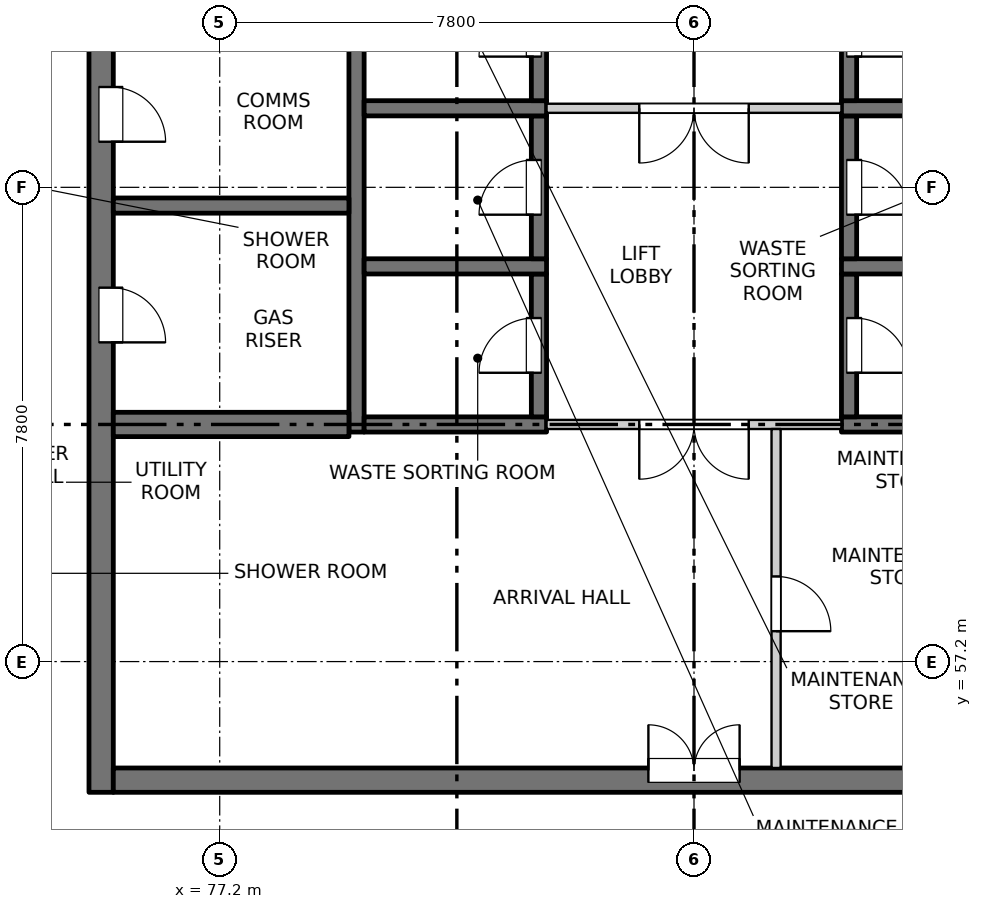
"""IFC4 building model, lengths in metres.
Left out: names, types, materials, properties, quantities, classifications, styles, units other than length and angle.
Written with IfcOpenShell. Run it as: python <this file> out.ifc"""

import sys

from ifc_helpers import new_model, si_unit, direction, frame, frame_2d, origin, place, context, subcontext, project, spatial, rectangle, extrude, element, fill, save


model = new_model("IFC4")
c1 = context("Model", 3, precision=1e-05, world=origin(), true_north=direction((0.0, 1.0)))
c2 = subcontext(c1, "Body", "Model", "MODEL_VIEW")
j1 = project(units=[si_unit("LENGTHUNIT", "METRE"), si_unit("PLANEANGLEUNIT", "RADIAN")], contexts=[c1])
p1 = place(None, origin())
s1 = spatial("IfcSite", under=j1, at=p1, CompositionType="ELEMENT")
p2 = place(p1, origin())
s2 = spatial("IfcBuilding", under=s1, at=p2, CompositionType="ELEMENT")
p3 = place(p2, frame((0.0, 0.0, 231.3)))
s3 = spatial("IfcBuildingStorey", under=s2, at=p3, CompositionType="ELEMENT", Elevation=231.3)
p4 = place(p3, frame((75.25, 55.05, -0.25), z_axis=(0.0, 0.0, 1.0), x_axis=(0.0, 1.0, 0.0)))
e1 = element("IfcWall", 1, at=p4, inside=s3, PredefinedType="SOLIDWALL", context=c2, shape_type="SweptSolid", body=[
    extrude(rectangle(XDim=22.25, YDim=0.4, at=frame_2d((11.125, 0.0))), origin(), (0.0, 0.0, 1.0), 3.4),
])
p5 = place(p4, frame((7.4, 0.0, 0.25)))
e2 = element("IfcOpeningElement", 2, at=p5, cuts=e1, PredefinedType="OPENING", context=c2, shape_type="SweptSolid", body=[
    extrude(rectangle(XDim=0.9, YDim=2.1, at=frame_2d((0.45, 1.05))), frame((0.0, 0.21, 0.0), z_axis=(0.0, -1.0, 0.0), x_axis=(1.0, 0.0, 0.0)), (0.0, 0.0, 1.0), 0.42),
])
p6 = place(p4, frame((10.7, 0.0, 0.25)))
e3 = element("IfcOpeningElement", 3, at=p6, cuts=e1, PredefinedType="OPENING", context=c2, shape_type="SweptSolid", body=[
    extrude(rectangle(XDim=0.9, YDim=2.1, at=frame_2d((0.45, 1.05))), frame((0.0, 0.21, 0.0), z_axis=(0.0, -1.0, 0.0), x_axis=(1.0, 0.0, 0.0)), (0.0, 0.0, 1.0), 0.42),
])
p7 = place(p4, frame((15.2, 0.0, 0.25)))
e4 = element("IfcOpeningElement", 4, at=p7, cuts=e1, PredefinedType="OPENING", context=c2, shape_type="SweptSolid", body=[
    extrude(rectangle(XDim=0.9, YDim=2.1, at=frame_2d((0.45, 1.05))), frame((0.0, 0.21, 0.0), z_axis=(0.0, -1.0, 0.0), x_axis=(1.0, 0.0, 0.0)), (0.0, 0.0, 1.0), 0.42),
])
p8 = place(p4, frame((20.0, 0.0, 0.25)))
e5 = element("IfcOpeningElement", 5, at=p8, cuts=e1, PredefinedType="OPENING", context=c2, shape_type="SweptSolid", body=[
    extrude(rectangle(XDim=0.9, YDim=2.1, at=frame_2d((0.45, 1.05))), frame((0.0, 0.21, 0.0), z_axis=(0.0, -1.0, 0.0), x_axis=(1.0, 0.0, 0.0)), (0.0, 0.0, 1.0), 0.42),
])
p9 = place(p3, frame((75.45, 55.25, -0.25), z_axis=(0.0, 0.0, 1.0), x_axis=(1.0, 0.0, 0.0)))
e6 = element("IfcWall", 6, at=p9, inside=s3, PredefinedType="SOLIDWALL", context=c2, shape_type="SweptSolid", body=[
    extrude(rectangle(XDim=19.1, YDim=0.4, at=frame_2d((9.55, 0.0))), origin(), (0.0, 0.0, 1.0), 3.4),
])
p10 = place(p9, frame((8.8, 0.0, 0.25)))
e7 = element("IfcOpeningElement", 7, at=p10, cuts=e6, PredefinedType="OPENING", context=c2, shape_type="SweptSolid", body=[
    extrude(rectangle(XDim=1.5, YDim=2.1, at=frame_2d((0.75, 1.05))), frame((0.0, 0.21, 0.0), z_axis=(0.0, -1.0, 0.0), x_axis=(1.0, 0.0, 0.0)), (0.0, 0.0, 1.0), 0.42),
])
p11 = place(p3, frame((79.45, 60.975, -0.25), z_axis=(0.0, 0.0, 1.0), x_axis=(0.0, 1.0, 0.0)))
e8 = element("IfcWall", 8, at=p11, inside=s3, PredefinedType="SOLIDWALL", context=c2, shape_type="SweptSolid", body=[
    extrude(rectangle(XDim=16.325, YDim=0.25, at=frame_2d((8.163, 0.0))), origin(), (0.0, 0.0, 1.0), 3.4),
])
p12 = place(p3, frame((79.575, 61.1, -0.25), z_axis=(0.0, 0.0, 1.0), x_axis=(1.0, 0.0, 0.0)))
e9 = element("IfcWall", 9, at=p12, inside=s3, PredefinedType="SOLIDWALL", context=c2, shape_type="SweptSolid", body=[
    extrude(rectangle(XDim=3.0, YDim=0.25, at=frame_2d((1.5, 0.0))), origin(), (0.0, 0.0, 1.0), 3.4),
])
p13 = place(p3, frame((82.45, 61.225, -0.25), z_axis=(0.0, 0.0, 1.0), x_axis=(0.0, 1.0, 0.0)))
e10 = element("IfcWall", 10, at=p13, inside=s3, PredefinedType="SOLIDWALL", context=c2, shape_type="SweptSolid", body=[
    extrude(rectangle(XDim=2.35, YDim=0.25, at=frame_2d((1.175, 0.0))), origin(), (0.0, 0.0, 1.0), 3.4),
])
p14 = place(p13, frame((0.725, 0.0, 0.25)))
e11 = element("IfcOpeningElement", 11, at=p14, cuts=e10, PredefinedType="OPENING", context=c2, shape_type="SweptSolid", body=[
    extrude(rectangle(XDim=0.9, YDim=2.1, at=frame_2d((0.45, 1.05))), frame((0.0, 0.135, 0.0), z_axis=(0.0, -1.0, 0.0), x_axis=(1.0, 0.0, 0.0)), (0.0, 0.0, 1.0), 0.27),
])
p15 = place(p3, frame((79.575, 63.7, -0.25), z_axis=(0.0, 0.0, 1.0), x_axis=(1.0, 0.0, 0.0)))
e12 = element("IfcWall", 12, at=p15, inside=s3, PredefinedType="SOLIDWALL", context=c2, shape_type="SweptSolid", body=[
    extrude(rectangle(XDim=3.0, YDim=0.25, at=frame_2d((1.5, 0.0))), origin(), (0.0, 0.0, 1.0), 3.4),
])
p16 = place(p3, frame((82.45, 63.825, -0.25), z_axis=(0.0, 0.0, 1.0), x_axis=(0.0, 1.0, 0.0)))
e13 = element("IfcWall", 13, at=p16, inside=s3, PredefinedType="SOLIDWALL", context=c2, shape_type="SweptSolid", body=[
    extrude(rectangle(XDim=2.35, YDim=0.25, at=frame_2d((1.175, 0.0))), origin(), (0.0, 0.0, 1.0), 3.4),
])
p17 = place(p16, frame((0.725, 0.0, 0.25)))
e14 = element("IfcOpeningElement", 14, at=p17, cuts=e13, PredefinedType="OPENING", context=c2, shape_type="SweptSolid", body=[
    extrude(rectangle(XDim=0.9, YDim=2.1, at=frame_2d((0.45, 1.05))), frame((0.0, 0.135, 0.0), z_axis=(0.0, -1.0, 0.0), x_axis=(1.0, 0.0, 0.0)), (0.0, 0.0, 1.0), 0.27),
])
p18 = place(p3, frame((79.575, 66.3, -0.25), z_axis=(0.0, 0.0, 1.0), x_axis=(1.0, 0.0, 0.0)))
e15 = element("IfcWall", 15, at=p18, inside=s3, PredefinedType="SOLIDWALL", context=c2, shape_type="SweptSolid", body=[
    extrude(rectangle(XDim=3.0, YDim=0.25, at=frame_2d((1.5, 0.0))), origin(), (0.0, 0.0, 1.0), 3.4),
])
p19 = place(p3, frame((82.45, 66.425, -0.25), z_axis=(0.0, 0.0, 1.0), x_axis=(0.0, 1.0, 0.0)))
e16 = element("IfcWall", 16, at=p19, inside=s3, PredefinedType="SOLIDWALL", context=c2, shape_type="SweptSolid", body=[
    extrude(rectangle(XDim=2.35, YDim=0.25, at=frame_2d((1.175, 0.0))), origin(), (0.0, 0.0, 1.0), 3.4),
])
p20 = place(p19, frame((0.725, 0.0, 0.25)))
e17 = element("IfcOpeningElement", 17, at=p20, cuts=e16, PredefinedType="OPENING", context=c2, shape_type="SweptSolid", body=[
    extrude(rectangle(XDim=0.9, YDim=2.1, at=frame_2d((0.45, 1.05))), frame((0.0, 0.135, 0.0), z_axis=(0.0, -1.0, 0.0), x_axis=(1.0, 0.0, 0.0)), (0.0, 0.0, 1.0), 0.27),
])
p21 = place(p3, frame((87.425, 61.1, -0.25), z_axis=(0.0, 0.0, 1.0), x_axis=(1.0, 0.0, 0.0)))
e18 = element("IfcWall", 18, at=p21, inside=s3, PredefinedType="SOLIDWALL", context=c2, shape_type="SweptSolid", body=[
    extrude(rectangle(XDim=3.0, YDim=0.25, at=frame_2d((1.5, 0.0))), origin(), (0.0, 0.0, 1.0), 3.4),
])
p22 = place(p3, frame((87.55, 61.225, -0.25), z_axis=(0.0, 0.0, 1.0), x_axis=(0.0, 1.0, 0.0)))
e19 = element("IfcWall", 19, at=p22, inside=s3, PredefinedType="SOLIDWALL", context=c2, shape_type="SweptSolid", body=[
    extrude(rectangle(XDim=2.35, YDim=0.25, at=frame_2d((1.175, 0.0))), origin(), (0.0, 0.0, 1.0), 3.4),
])
p23 = place(p22, frame((0.725, 0.0, 0.25)))
e20 = element("IfcOpeningElement", 20, at=p23, cuts=e19, PredefinedType="OPENING", context=c2, shape_type="SweptSolid", body=[
    extrude(rectangle(XDim=0.9, YDim=2.1, at=frame_2d((0.45, 1.05))), frame((0.0, 0.135, 0.0), z_axis=(0.0, -1.0, 0.0), x_axis=(1.0, 0.0, 0.0)), (0.0, 0.0, 1.0), 0.27),
])
p24 = place(p3, frame((87.425, 63.7, -0.25), z_axis=(0.0, 0.0, 1.0), x_axis=(1.0, 0.0, 0.0)))
e21 = element("IfcWall", 21, at=p24, inside=s3, PredefinedType="SOLIDWALL", context=c2, shape_type="SweptSolid", body=[
    extrude(rectangle(XDim=3.0, YDim=0.25, at=frame_2d((1.5, 0.0))), origin(), (0.0, 0.0, 1.0), 3.4),
])
p25 = place(p3, frame((87.55, 63.825, -0.25), z_axis=(0.0, 0.0, 1.0), x_axis=(0.0, 1.0, 0.0)))
e22 = element("IfcWall", 22, at=p25, inside=s3, PredefinedType="SOLIDWALL", context=c2, shape_type="SweptSolid", body=[
    extrude(rectangle(XDim=2.35, YDim=0.25, at=frame_2d((1.175, 0.0))), origin(), (0.0, 0.0, 1.0), 3.4),
])
p26 = place(p25, frame((0.725, 0.0, 0.25)))
e23 = element("IfcOpeningElement", 23, at=p26, cuts=e22, PredefinedType="OPENING", context=c2, shape_type="SweptSolid", body=[
    extrude(rectangle(XDim=0.9, YDim=2.1, at=frame_2d((0.45, 1.05))), frame((0.0, 0.135, 0.0), z_axis=(0.0, -1.0, 0.0), x_axis=(1.0, 0.0, 0.0)), (0.0, 0.0, 1.0), 0.27),
])
p27 = place(p3, frame((87.425, 66.3, -0.25), z_axis=(0.0, 0.0, 1.0), x_axis=(1.0, 0.0, 0.0)))
e24 = element("IfcWall", 24, at=p27, inside=s3, PredefinedType="SOLIDWALL", context=c2, shape_type="SweptSolid", body=[
    extrude(rectangle(XDim=3.0, YDim=0.25, at=frame_2d((1.5, 0.0))), origin(), (0.0, 0.0, 1.0), 3.4),
])
p28 = place(p3, frame((87.55, 66.425, -0.25), z_axis=(0.0, 0.0, 1.0), x_axis=(0.0, 1.0, 0.0)))
e25 = element("IfcWall", 25, at=p28, inside=s3, PredefinedType="SOLIDWALL", context=c2, shape_type="SweptSolid", body=[
    extrude(rectangle(XDim=2.35, YDim=0.25, at=frame_2d((1.175, 0.0))), origin(), (0.0, 0.0, 1.0), 3.4),
])
p29 = place(p28, frame((0.725, 0.0, 0.25)))
e26 = element("IfcOpeningElement", 26, at=p29, cuts=e25, PredefinedType="OPENING", context=c2, shape_type="SweptSolid", body=[
    extrude(rectangle(XDim=0.9, YDim=2.1, at=frame_2d((0.45, 1.05))), frame((0.0, 0.135, 0.0), z_axis=(0.0, -1.0, 0.0), x_axis=(1.0, 0.0, 0.0)), (0.0, 0.0, 1.0), 0.27),
])
p30 = place(p3, frame((75.45, 61.1, -0.25), z_axis=(0.0, 0.0, 1.0), x_axis=(1.0, 0.0, 0.0)))
e27 = element("IfcWall", 27, at=p30, inside=s3, PredefinedType="SOLIDWALL", context=c2, shape_type="SweptSolid", body=[
    extrude(rectangle(XDim=3.875, YDim=0.4, at=frame_2d((1.938, 0.0))), origin(), (0.0, 0.0, 1.0), 3.4),
])
p31 = place(p3, frame((75.45, 64.7, -0.25), z_axis=(0.0, 0.0, 1.0), x_axis=(1.0, 0.0, 0.0)))
e28 = element("IfcWall", 28, at=p31, inside=s3, PredefinedType="SOLIDWALL", context=c2, shape_type="SweptSolid", body=[
    extrude(rectangle(XDim=3.875, YDim=0.25, at=frame_2d((1.938, 0.0))), origin(), (0.0, 0.0, 1.0), 3.4),
])
p32 = place(p3, frame((82.575, 61.1, 0.0), z_axis=(0.0, 0.0, 1.0), x_axis=(1.0, 0.0, 0.0)))
e29 = element("IfcWall", 29, at=p32, inside=s3, PredefinedType="PARTITIONING", context=c2, shape_type="SweptSolid", body=[
    extrude(rectangle(XDim=4.85, YDim=0.15, at=frame_2d((2.425, 0.0))), origin(), (0.0, 0.0, 1.0), 3.15),
])
p33 = place(p32, frame((1.525, 0.0, 0.0)))
e30 = element("IfcOpeningElement", 30, at=p33, cuts=e29, PredefinedType="OPENING", context=c2, shape_type="SweptSolid", body=[
    extrude(rectangle(XDim=1.8, YDim=2.1, at=frame_2d((0.9, 1.05))), frame((0.0, 0.085, 0.0), z_axis=(0.0, -1.0, 0.0), x_axis=(1.0, 0.0, 0.0)), (0.0, 0.0, 1.0), 0.17),
])
p34 = place(p3, frame((82.575, 66.3, 0.0), z_axis=(0.0, 0.0, 1.0), x_axis=(1.0, 0.0, 0.0)))
e31 = element("IfcWall", 31, at=p34, inside=s3, PredefinedType="PARTITIONING", context=c2, shape_type="SweptSolid", body=[
    extrude(rectangle(XDim=4.85, YDim=0.15, at=frame_2d((2.425, 0.0))), origin(), (0.0, 0.0, 1.0), 3.15),
])
p35 = place(p34, frame((1.525, 0.0, 0.0)))
e32 = element("IfcOpeningElement", 32, at=p35, cuts=e31, PredefinedType="OPENING", context=c2, shape_type="SweptSolid", body=[
    extrude(rectangle(XDim=1.8, YDim=2.1, at=frame_2d((0.9, 1.05))), frame((0.0, 0.085, 0.0), z_axis=(0.0, -1.0, 0.0), x_axis=(1.0, 0.0, 0.0)), (0.0, 0.0, 1.0), 0.17),
])
p36 = place(p3, frame((86.35, 55.45, 0.0), z_axis=(0.0, 0.0, 1.0), x_axis=(0.0, 1.0, 0.0)))
e33 = element("IfcWall", 33, at=p36, inside=s3, PredefinedType="PARTITIONING", context=c2, shape_type="SweptSolid", body=[
    extrude(rectangle(XDim=5.575, YDim=0.15, at=frame_2d((2.788, 0.0))), origin(), (0.0, 0.0, 1.0), 3.15),
])
p37 = place(p36, frame((2.25, 0.0, 0.0)))
e34 = element("IfcOpeningElement", 34, at=p37, cuts=e33, PredefinedType="OPENING", context=c2, shape_type="SweptSolid", body=[
    extrude(rectangle(XDim=0.9, YDim=2.1, at=frame_2d((0.45, 1.05))), frame((0.0, 0.085, 0.0), z_axis=(0.0, -1.0, 0.0), x_axis=(1.0, 0.0, 0.0)), (0.0, 0.0, 1.0), 0.17),
])
p38 = place(p10, origin())
e35 = element("IfcDoor", 35, at=p38, inside=s3, OperationType="DOUBLE_DOOR_SINGLE_SWING", PredefinedType="DOOR", context=c2, shape_type="SweptSolid", body=[
    extrude(rectangle(XDim=1.5, YDim=2.1, at=frame_2d((0.75, 1.05))), frame((0.0, 0.185, 0.0), z_axis=(0.0, -1.0, 0.0), x_axis=(1.0, 0.0, 0.0)), (0.0, 0.0, 1.0), 0.05),
])
fill(e7, e35)
p39 = place(p37, origin())
e36 = element("IfcDoor", 36, at=p39, inside=s3, OperationType="SINGLE_SWING_RIGHT", PredefinedType="DOOR", context=c2, shape_type="SweptSolid", body=[
    extrude(rectangle(XDim=0.9, YDim=2.1, at=frame_2d((0.45, 1.05))), frame((0.0, 0.025, 0.0), z_axis=(0.0, -1.0, 0.0), x_axis=(1.0, 0.0, 0.0)), (0.0, 0.0, 1.0), 0.05),
])
fill(e34, e36)
p40 = place(p33, origin())
e37 = element("IfcDoor", 37, at=p40, inside=s3, OperationType="DOUBLE_DOOR_SINGLE_SWING", PredefinedType="DOOR", context=c2, shape_type="SweptSolid", body=[
    extrude(rectangle(XDim=1.8, YDim=2.1, at=frame_2d((0.9, 1.05))), frame((0.0, 0.025, 0.0), z_axis=(0.0, -1.0, 0.0), x_axis=(1.0, 0.0, 0.0)), (0.0, 0.0, 1.0), 0.05),
])
fill(e30, e37)
p41 = place(p14, origin())
e38 = element("IfcDoor", 38, at=p41, inside=s3, OperationType="SINGLE_SWING_LEFT", PredefinedType="DOOR", context=c2, shape_type="SweptSolid", body=[
    extrude(rectangle(XDim=0.9, YDim=2.1, at=frame_2d((0.45, 1.05))), frame((0.0, 0.11, 0.0), z_axis=(0.0, -1.0, 0.0), x_axis=(1.0, 0.0, 0.0)), (0.0, 0.0, 1.0), 0.05),
])
fill(e11, e38)
p42 = place(p23, origin())
e39 = element("IfcDoor", 39, at=p42, inside=s3, OperationType="SINGLE_SWING_RIGHT", PredefinedType="DOOR", context=c2, shape_type="SweptSolid", body=[
    extrude(rectangle(XDim=0.9, YDim=2.1, at=frame_2d((0.45, 1.05))), frame((0.0, -0.06, 0.0), z_axis=(0.0, -1.0, 0.0), x_axis=(1.0, 0.0, 0.0)), (0.0, 0.0, 1.0), 0.05),
])
fill(e20, e39)
p43 = place(p5, origin())
e40 = element("IfcDoor", 40, at=p43, inside=s3, OperationType="SINGLE_SWING_RIGHT", PredefinedType="DOOR", context=c2, shape_type="SweptSolid", body=[
    extrude(rectangle(XDim=0.9, YDim=2.1, at=frame_2d((0.45, 1.05))), frame((0.0, -0.135, 0.0), z_axis=(0.0, -1.0, 0.0), x_axis=(1.0, 0.0, 0.0)), (0.0, 0.0, 1.0), 0.05),
])
fill(e2, e40)
p44 = place(p17, origin())
e41 = element("IfcDoor", 41, at=p44, inside=s3, OperationType="SINGLE_SWING_LEFT", PredefinedType="DOOR", context=c2, shape_type="SweptSolid", body=[
    extrude(rectangle(XDim=0.9, YDim=2.1, at=frame_2d((0.45, 1.05))), frame((0.0, 0.11, 0.0), z_axis=(0.0, -1.0, 0.0), x_axis=(1.0, 0.0, 0.0)), (0.0, 0.0, 1.0), 0.05),
])
fill(e14, e41)
p45 = place(p26, origin())
e42 = element("IfcDoor", 42, at=p45, inside=s3, OperationType="SINGLE_SWING_RIGHT", PredefinedType="DOOR", context=c2, shape_type="SweptSolid", body=[
    extrude(rectangle(XDim=0.9, YDim=2.1, at=frame_2d((0.45, 1.05))), frame((0.0, -0.06, 0.0), z_axis=(0.0, -1.0, 0.0), x_axis=(1.0, 0.0, 0.0)), (0.0, 0.0, 1.0), 0.05),
])
fill(e23, e42)
p46 = place(p6, origin())
e43 = element("IfcDoor", 43, at=p46, inside=s3, OperationType="SINGLE_SWING_RIGHT", PredefinedType="DOOR", context=c2, shape_type="SweptSolid", body=[
    extrude(rectangle(XDim=0.9, YDim=2.1, at=frame_2d((0.45, 1.05))), frame((0.0, -0.135, 0.0), z_axis=(0.0, -1.0, 0.0), x_axis=(1.0, 0.0, 0.0)), (0.0, 0.0, 1.0), 0.05),
])
fill(e3, e43)
p47 = place(p35, origin())
e44 = element("IfcDoor", 44, at=p47, inside=s3, OperationType="DOUBLE_DOOR_SINGLE_SWING", PredefinedType="DOOR", context=c2, shape_type="SweptSolid", body=[
    extrude(rectangle(XDim=1.8, YDim=2.1, at=frame_2d((0.9, 1.05))), frame((0.0, 0.025, 0.0), z_axis=(0.0, -1.0, 0.0), x_axis=(1.0, 0.0, 0.0)), (0.0, 0.0, 1.0), 0.05),
])
fill(e32, e44)
p48 = place(p20, origin())
e45 = element("IfcDoor", 45, at=p48, inside=s3, OperationType="SINGLE_SWING_LEFT", PredefinedType="DOOR", context=c2, shape_type="SweptSolid", body=[
    extrude(rectangle(XDim=0.9, YDim=2.1, at=frame_2d((0.45, 1.05))), frame((0.0, 0.11, 0.0), z_axis=(0.0, -1.0, 0.0), x_axis=(1.0, 0.0, 0.0)), (0.0, 0.0, 1.0), 0.05),
])
fill(e17, e45)
p49 = place(p29, origin())
e46 = element("IfcDoor", 46, at=p49, inside=s3, OperationType="SINGLE_SWING_RIGHT", PredefinedType="DOOR", context=c2, shape_type="SweptSolid", body=[
    extrude(rectangle(XDim=0.9, YDim=2.1, at=frame_2d((0.45, 1.05))), frame((0.0, -0.06, 0.0), z_axis=(0.0, -1.0, 0.0), x_axis=(1.0, 0.0, 0.0)), (0.0, 0.0, 1.0), 0.05),
])
fill(e26, e46)
save(model, sys.argv[1])
